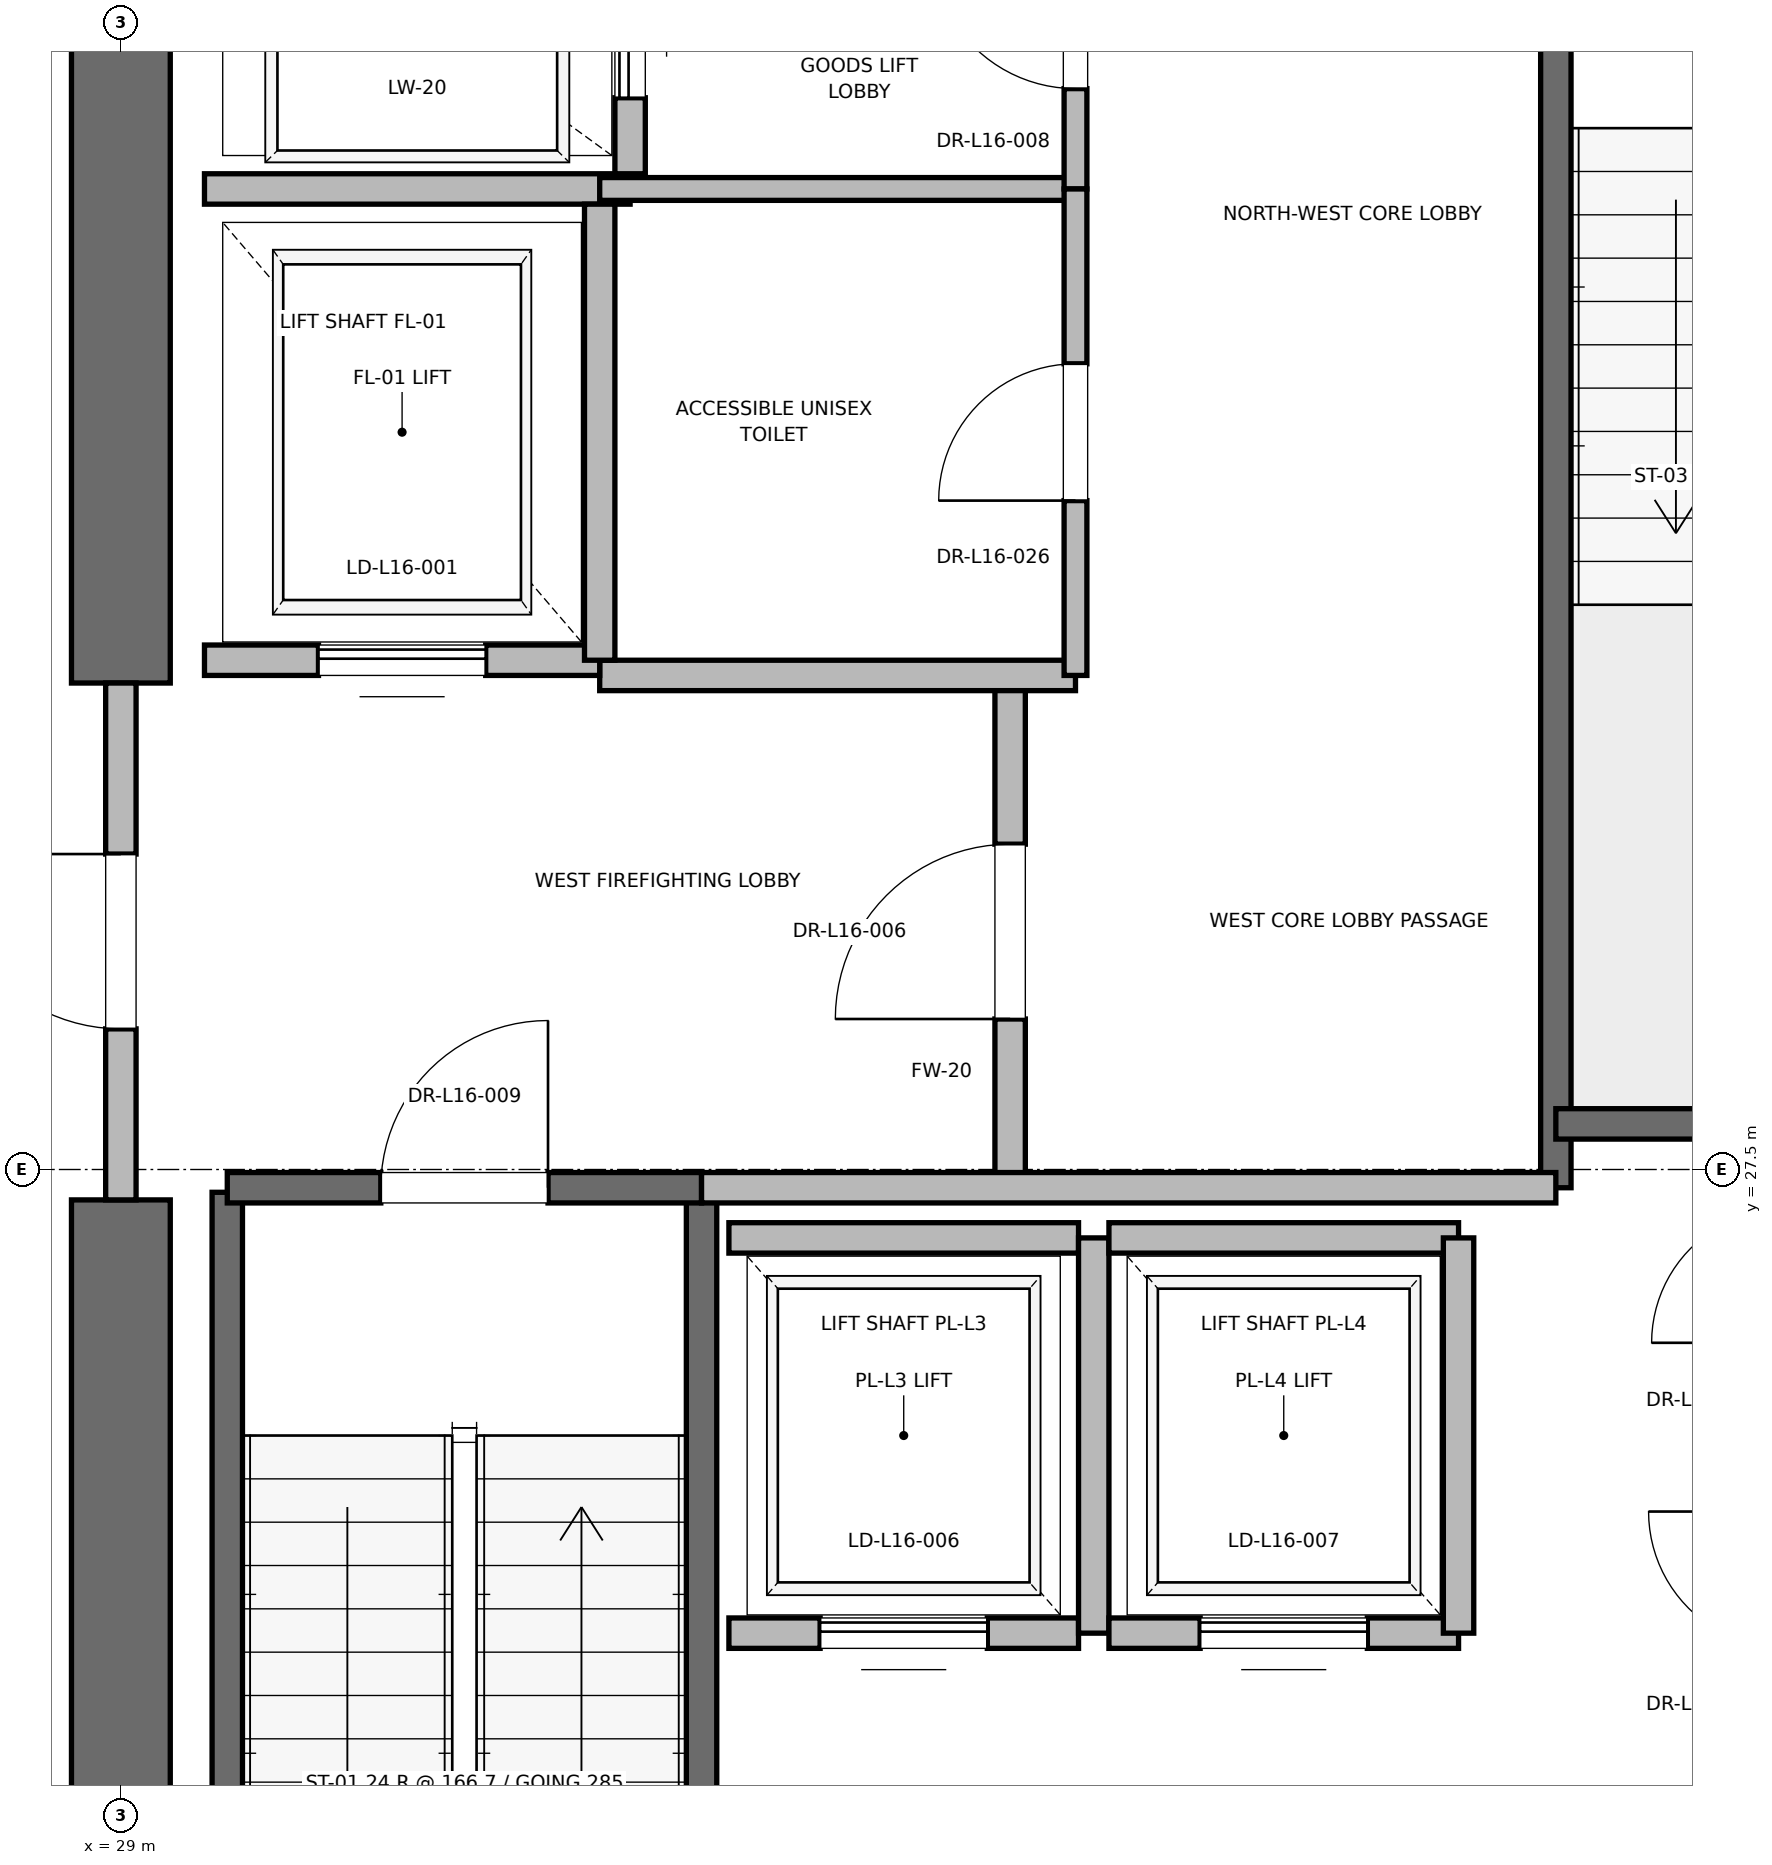
"""IFC4 building model, lengths in metres.
Left out: names, types, materials, properties, quantities, classifications, styles, units other than length and angle.
Written with IfcOpenShell. Run it as: python <this file> out.ifc"""

import sys

from ifc_helpers import new_model, si_unit, direction, frame, frame_2d, origin, place, context, subcontext, project, spatial, rectangle, extrude, element, fill, save


model = new_model("IFC4")
c1 = context("Model", 3, precision=1e-05, world=origin(), true_north=direction((0.0, 1.0)))
c2 = subcontext(c1, "Body", "Model", "MODEL_VIEW")
j1 = project(units=[si_unit("LENGTHUNIT", "METRE"), si_unit("PLANEANGLEUNIT", "RADIAN")], contexts=[c1])
p1 = place(None, origin())
s1 = spatial("IfcSite", under=j1, at=p1, CompositionType="ELEMENT")
p2 = place(p1, origin())
s2 = spatial("IfcBuilding", under=s1, at=p2, CompositionType="ELEMENT")
p3 = place(p2, frame((0.0, 0.0, 71.6)))
s3 = spatial("IfcBuildingStorey", under=s2, at=p3, CompositionType="ELEMENT", Elevation=71.6)
p4 = place(p3, frame((29.0, 18.5, 0.0), z_axis=(0.0, 0.0, 1.0), x_axis=(0.0, 1.0, 0.0)))
e1 = element("IfcWall", 1, at=p4, inside=s3, PredefinedType="SHEAR", context=c2, shape_type="SweptSolid", body=[
    extrude(rectangle(XDim=8.8, YDim=0.65, at=frame_2d((4.4, 0.0))), origin(), (0.0, 0.0, 1.0), 3.76),
])
p5 = place(p3, frame((29.0, 30.7, 0.0), z_axis=(0.0, 0.0, 1.0), x_axis=(0.0, 1.0, 0.0)))
e2 = element("IfcWall", 2, at=p5, inside=s3, PredefinedType="SHEAR", context=c2, shape_type="SweptSolid", body=[
    extrude(rectangle(XDim=5.8, YDim=0.65, at=frame_2d((2.9, 0.0))), origin(), (0.0, 0.0, 1.0), 3.76),
])
p6 = place(p3, frame((29.7, 19.2, 0.0), z_axis=(0.0, 0.0, 1.0), x_axis=(0.0, 1.0, 0.0)))
e3 = element("IfcWall", 3, at=p6, inside=s3, PredefinedType="SOLIDWALL", context=c2, shape_type="SweptSolid", body=[
    extrude(rectangle(XDim=8.15, YDim=0.2, at=frame_2d((4.075, 0.0))), origin(), (0.0, 0.0, 1.0), 3.76),
])
p7 = place(p3, frame((32.82, 18.6, 0.0), z_axis=(0.0, 0.0, 1.0), x_axis=(0.0, 1.0, 0.0)))
e4 = element("IfcWall", 4, at=p7, inside=s3, PredefinedType="SOLIDWALL", context=c2, shape_type="SweptSolid", body=[
    extrude(rectangle(XDim=8.78, YDim=0.2, at=frame_2d((4.39, 0.0))), origin(), (0.0, 0.0, 1.0), 3.76),
])
p8 = place(p3, frame((29.7, 27.38, 0.0), z_axis=(0.0, 0.0, 1.0), x_axis=(1.0, 0.0, 0.0)))
e5 = element("IfcWall", 5, at=p8, inside=s3, PredefinedType="SOLIDWALL", context=c2, shape_type="SweptSolid", body=[
    extrude(rectangle(XDim=3.12, YDim=0.2, at=frame_2d((1.56, 0.0))), origin(), (0.0, 0.0, 1.0), 3.76),
])
p9 = place(p8, frame((1.01, 0.0, 0.0)))
e6 = element("IfcOpeningElement", 6, at=p9, cuts=e5, PredefinedType="OPENING", context=c2, shape_type="SweptSolid", body=[
    extrude(rectangle(XDim=1.1, YDim=2.15, at=frame_2d((0.55, 1.075))), frame((0.0, 0.1, 0.0), z_axis=(0.0, -1.0, 0.0), x_axis=(1.0, 0.0, 0.0)), (0.0, 0.0, 1.0), 0.2),
])
p10 = place(p3, frame((38.44, 27.38, 0.0), z_axis=(0.0, 0.0, 1.0), x_axis=(0.0, 1.0, 0.0)))
e7 = element("IfcWall", 7, at=p10, inside=s3, PredefinedType="SOLIDWALL", context=c2, shape_type="SweptSolid", body=[
    extrude(rectangle(XDim=8.87, YDim=0.2, at=frame_2d((4.435, 0.0))), origin(), (0.0, 0.0, 1.0), 3.76),
])
p11 = place(p3, frame((38.44, 27.8, 0.0), z_axis=(0.0, 0.0, 1.0), x_axis=(1.0, 0.0, 0.0)))
e8 = element("IfcWall", 8, at=p11, inside=s3, PredefinedType="SOLIDWALL", context=c2, shape_type="SweptSolid", body=[
    extrude(rectangle(XDim=3.32, YDim=0.2, at=frame_2d((1.66, 0.0))), origin(), (0.0, 0.0, 1.0), 3.76),
])
p12 = place(p3, frame((34.85, 27.38, 0.0), z_axis=(0.0, 0.0, 1.0), x_axis=(0.0, 1.0, 0.0)))
e9 = element("IfcWall", 9, at=p12, inside=s3, PredefinedType="PARTITIONING", context=c2, shape_type="SweptSolid", body=[
    extrude(rectangle(XDim=3.37, YDim=0.2, at=frame_2d((1.685, 0.0))), origin(), (0.0, 0.0, 1.0), 3.76),
])
p13 = place(p12, frame((1.11, 0.0, 0.0)))
e10 = element("IfcOpeningElement", 10, at=p13, cuts=e9, PredefinedType="OPENING", context=c2, shape_type="SweptSolid", body=[
    extrude(rectangle(XDim=1.15, YDim=2.2, at=frame_2d((0.575, 1.1))), frame((0.0, 0.1, 0.0), z_axis=(0.0, -1.0, 0.0), x_axis=(1.0, 0.0, 0.0)), (0.0, 0.0, 1.0), 0.2),
])
p14 = place(p3, frame((29.0, 27.3, 0.0), z_axis=(0.0, 0.0, 1.0), x_axis=(0.0, 1.0, 0.0)))
e11 = element("IfcWall", 11, at=p14, inside=s3, PredefinedType="PARTITIONING", context=c2, shape_type="SweptSolid", body=[
    extrude(rectangle(XDim=3.4, YDim=0.2, at=frame_2d((1.7, 0.0))), origin(), (0.0, 0.0, 1.0), 2.54),
])
p15 = place(p14, frame((1.125, 0.0, 0.0)))
e12 = element("IfcOpeningElement", 12, at=p15, cuts=e11, PredefinedType="OPENING", context=c2, shape_type="SweptSolid", body=[
    extrude(rectangle(XDim=1.15, YDim=2.2, at=frame_2d((0.575, 1.1))), frame((0.0, 0.1, 0.0), z_axis=(0.0, -1.0, 0.0), x_axis=(1.0, 0.0, 0.0)), (0.0, 0.0, 1.0), 0.2),
])
p16 = place(p3, frame((32.82, 27.38, 0.0), z_axis=(0.0, 0.0, 1.0), x_axis=(1.0, 0.0, 0.0)))
e13 = element("IfcWall", 13, at=p16, inside=s3, PredefinedType="PARTITIONING", context=c2, shape_type="SweptSolid", body=[
    extrude(rectangle(XDim=5.62, YDim=0.2, at=frame_2d((2.81, 0.0))), origin(), (0.0, 0.0, 1.0), 3.76),
])
p17 = place(p3, frame((32.15, 30.75, 0.0), z_axis=(0.0, 0.0, 1.0), x_axis=(1.0, 0.0, 0.0)))
e14 = element("IfcWall", 14, at=p17, inside=s3, PredefinedType="PARTITIONING", context=c2, shape_type="SweptSolid", body=[
    extrude(rectangle(XDim=3.13, YDim=0.2, at=frame_2d((1.565, 0.0))), origin(), (0.0, 0.0, 1.0), 3.76),
])
p18 = place(p3, frame((29.55, 30.85, 0.0), z_axis=(0.0, 0.0, 1.0), x_axis=(1.0, 0.0, 0.0)))
e15 = element("IfcWall", 15, at=p18, inside=s3, PredefinedType="SOLIDWALL", context=c2, shape_type="SweptSolid", body=[
    extrude(rectangle(XDim=2.6, YDim=0.2, at=frame_2d((1.3, 0.0))), origin(), (0.0, 0.0, 1.0), 2.54),
])
p19 = place(p18, frame((0.75, 0.0, 0.0)))
e16 = element("IfcOpeningElement", 16, at=p19, cuts=e15, PredefinedType="OPENING", context=c2, shape_type="SweptSolid", body=[
    extrude(rectangle(XDim=1.1, YDim=2.2, at=frame_2d((0.55, 1.1))), frame((0.0, 0.1, 0.0), z_axis=(0.0, -1.0, 0.0), x_axis=(1.0, 0.0, 0.0)), (0.0, 0.0, 1.0), 0.2),
])
p20 = place(p3, frame((29.55, 33.95, 0.0), z_axis=(0.0, 0.0, 1.0), x_axis=(1.0, 0.0, 0.0)))
e17 = element("IfcWall", 17, at=p20, inside=s3, PredefinedType="SOLIDWALL", context=c2, shape_type="SweptSolid", body=[
    extrude(rectangle(XDim=2.8, YDim=0.2, at=frame_2d((1.4, 0.0))), origin(), (0.0, 0.0, 1.0), 3.76),
])
p21 = place(p3, frame((32.15, 30.85, 0.0), z_axis=(0.0, 0.0, 1.0), x_axis=(0.0, 1.0, 0.0)))
e18 = element("IfcWall", 18, at=p21, inside=s3, PredefinedType="SOLIDWALL", context=c2, shape_type="SweptSolid", body=[
    extrude(rectangle(XDim=3.0, YDim=0.2, at=frame_2d((1.5, 0.0))), origin(), (0.0, 0.0, 1.0), 3.76),
])
p22 = place(p3, frame((32.35, 34.05, 0.0), z_axis=(0.0, 0.0, 1.0), x_axis=(0.0, 1.0, 0.0)))
e19 = element("IfcWall", 19, at=p22, inside=s3, PredefinedType="SOLIDWALL", context=c2, shape_type="SweptSolid", body=[
    extrude(rectangle(XDim=2.1, YDim=0.2, at=frame_2d((1.05, 0.0))), origin(), (0.0, 0.0, 1.0), 3.76),
])
p23 = place(p22, frame((0.5, 0.0, 0.0)))
e20 = element("IfcOpeningElement", 20, at=p23, cuts=e19, PredefinedType="OPENING", context=c2, shape_type="SweptSolid", body=[
    extrude(rectangle(XDim=1.1, YDim=2.2, at=frame_2d((0.55, 1.1))), frame((0.0, 0.1, 0.0), z_axis=(0.0, -1.0, 0.0), x_axis=(1.0, 0.0, 0.0)), (0.0, 0.0, 1.0), 0.2),
])
p24 = place(p3, frame((33.0, 24.45, 0.0), z_axis=(0.0, 0.0, 1.0), x_axis=(1.0, 0.0, 0.0)))
e21 = element("IfcWall", 21, at=p24, inside=s3, PredefinedType="SOLIDWALL", context=c2, shape_type="SweptSolid", body=[
    extrude(rectangle(XDim=2.3, YDim=0.2, at=frame_2d((1.15, 0.0))), origin(), (0.0, 0.0, 1.0), 3.76),
])
p25 = place(p24, frame((0.6, 0.0, 0.0)))
e22 = element("IfcOpeningElement", 22, at=p25, cuts=e21, PredefinedType="OPENING", context=c2, shape_type="SweptSolid", body=[
    extrude(rectangle(XDim=1.1, YDim=2.2, at=frame_2d((0.55, 1.1))), frame((0.0, 0.1, 0.0), z_axis=(0.0, -1.0, 0.0), x_axis=(1.0, 0.0, 0.0)), (0.0, 0.0, 1.0), 0.2),
])
p26 = place(p3, frame((35.3, 27.05, 0.0), z_axis=(0.0, 0.0, 1.0), x_axis=(-1.0, 0.0, 0.0)))
e23 = element("IfcWall", 23, at=p26, inside=s3, PredefinedType="SOLIDWALL", context=c2, shape_type="SweptSolid", body=[
    extrude(rectangle(XDim=2.3, YDim=0.2, at=frame_2d((1.15, 0.0))), origin(), (0.0, 0.0, 1.0), 3.76),
])
p27 = place(p3, frame((35.4, 24.45, 0.0), z_axis=(0.0, 0.0, 1.0), x_axis=(0.0, 1.0, 0.0)))
e24 = element("IfcWall", 24, at=p27, inside=s3, PredefinedType="SOLIDWALL", context=c2, shape_type="SweptSolid", body=[
    extrude(rectangle(XDim=2.6, YDim=0.2, at=frame_2d((1.3, 0.0))), origin(), (0.0, 0.0, 1.0), 3.76),
])
p28 = place(p3, frame((35.5, 24.45, 0.0), z_axis=(0.0, 0.0, 1.0), x_axis=(1.0, 0.0, 0.0)))
e25 = element("IfcWall", 25, at=p28, inside=s3, PredefinedType="SOLIDWALL", context=c2, shape_type="SweptSolid", body=[
    extrude(rectangle(XDim=2.3, YDim=0.2, at=frame_2d((1.15, 0.0))), origin(), (0.0, 0.0, 1.0), 3.76),
])
p29 = place(p28, frame((0.6, 0.0, 0.0)))
e26 = element("IfcOpeningElement", 26, at=p29, cuts=e25, PredefinedType="OPENING", context=c2, shape_type="SweptSolid", body=[
    extrude(rectangle(XDim=1.1, YDim=2.2, at=frame_2d((0.55, 1.1))), frame((0.0, 0.1, 0.0), z_axis=(0.0, -1.0, 0.0), x_axis=(1.0, 0.0, 0.0)), (0.0, 0.0, 1.0), 0.2),
])
p30 = place(p3, frame((37.8, 27.05, 0.0), z_axis=(0.0, 0.0, 1.0), x_axis=(-1.0, 0.0, 0.0)))
e27 = element("IfcWall", 27, at=p30, inside=s3, PredefinedType="SOLIDWALL", context=c2, shape_type="SweptSolid", body=[
    extrude(rectangle(XDim=2.3, YDim=0.2, at=frame_2d((1.15, 0.0))), origin(), (0.0, 0.0, 1.0), 3.76),
])
p31 = place(p3, frame((37.8, 24.45, 0.0), z_axis=(0.0, 0.0, 1.0), x_axis=(0.0, 1.0, 0.0)))
e28 = element("IfcWall", 28, at=p31, inside=s3, PredefinedType="SOLIDWALL", context=c2, shape_type="SweptSolid", body=[
    extrude(rectangle(XDim=2.6, YDim=0.2, at=frame_2d((1.3, 0.0))), origin(), (0.0, 0.0, 1.0), 3.76),
])
p32 = place(p3, frame((32.15, 33.95, 0.0), z_axis=(0.0, 0.0, 1.0), x_axis=(1.0, 0.0, 0.0)))
e29 = element("IfcWall", 29, at=p32, inside=s3, PredefinedType="PARTITIONING", context=c2, shape_type="SweptSolid", body=[
    extrude(rectangle(XDim=3.13, YDim=0.15, at=frame_2d((1.565, 0.0))), origin(), (0.0, 0.0, 1.0), 2.85),
])
p33 = place(p3, frame((35.28, 33.95, 0.0), z_axis=(0.0, 0.0, 1.0), x_axis=(0.0, 1.0, 0.0)))
e30 = element("IfcWall", 30, at=p33, inside=s3, PredefinedType="PARTITIONING", context=c2, shape_type="SweptSolid", body=[
    extrude(rectangle(XDim=2.27, YDim=0.15, at=frame_2d((1.135, 0.0))), origin(), (0.0, 0.0, 1.0), 2.54),
])
p34 = place(p33, frame((0.66, 0.0, 0.0)))
e31 = element("IfcOpeningElement", 31, at=p34, cuts=e30, PredefinedType="OPENING", context=c2, shape_type="SweptSolid", body=[
    extrude(rectangle(XDim=0.95, YDim=2.15, at=frame_2d((0.475, 1.075))), frame((0.0, 0.075, 0.0), z_axis=(0.0, -1.0, 0.0), x_axis=(1.0, 0.0, 0.0)), (0.0, 0.0, 1.0), 0.15),
])
p35 = place(p3, frame((35.28, 30.75, 0.0), z_axis=(0.0, 0.0, 1.0), x_axis=(0.0, 1.0, 0.0)))
e32 = element("IfcWall", 32, at=p35, inside=s3, PredefinedType="PARTITIONING", context=c2, shape_type="SweptSolid", body=[
    extrude(rectangle(XDim=3.2, YDim=0.15, at=frame_2d((1.6, 0.0))), origin(), (0.0, 0.0, 1.0), 2.85),
])
p36 = place(p35, frame((1.15, 0.0, 0.0)))
e33 = element("IfcOpeningElement", 33, at=p36, cuts=e32, PredefinedType="OPENING", context=c2, shape_type="SweptSolid", body=[
    extrude(rectangle(XDim=0.9, YDim=2.1, at=frame_2d((0.45, 1.05))), frame((0.0, 0.075, 0.0), z_axis=(0.0, -1.0, 0.0), x_axis=(1.0, 0.0, 0.0)), (0.0, 0.0, 1.0), 0.15),
])
p37 = place(p9, origin())
e34 = element("IfcDoor", 34, at=p37, inside=s3, OperationType="SINGLE_SWING_RIGHT", PredefinedType="DOOR", context=c2, shape_type="SweptSolid", body=[
    extrude(rectangle(XDim=1.1, YDim=2.15, at=frame_2d((0.55, 1.075))), frame((0.0, 0.025, 0.0), z_axis=(0.0, -1.0, 0.0), x_axis=(1.0, 0.0, 0.0)), (0.0, 0.0, 1.0), 0.05),
])
fill(e6, e34)
p38 = place(p13, origin())
e35 = element("IfcDoor", 35, at=p38, inside=s3, OperationType="SINGLE_SWING_LEFT", PredefinedType="DOOR", context=c2, shape_type="SweptSolid", body=[
    extrude(rectangle(XDim=1.15, YDim=2.2, at=frame_2d((0.575, 1.1))), frame((0.0, 0.025, 0.0), z_axis=(0.0, -1.0, 0.0), x_axis=(1.0, 0.0, 0.0)), (0.0, 0.0, 1.0), 0.05),
])
fill(e10, e35)
p39 = place(p15, origin())
e36 = element("IfcDoor", 36, at=p39, inside=s3, OperationType="SINGLE_SWING_RIGHT", PredefinedType="DOOR", context=c2, shape_type="SweptSolid", body=[
    extrude(rectangle(XDim=1.15, YDim=2.2, at=frame_2d((0.575, 1.1))), frame((0.0, 0.025, 0.0), z_axis=(0.0, -1.0, 0.0), x_axis=(1.0, 0.0, 0.0)), (0.0, 0.0, 1.0), 0.05),
])
fill(e12, e36)
p40 = place(p19, origin())
e37 = element("IfcDoor", 37, at=p40, inside=s3, OperationType="SLIDING_TO_RIGHT", PredefinedType="DOOR", context=c2, shape_type="SweptSolid", body=[
    extrude(rectangle(XDim=1.1, YDim=2.2, at=frame_2d((0.55, 1.1))), frame((0.0, 0.025, 0.0), z_axis=(0.0, -1.0, 0.0), x_axis=(1.0, 0.0, 0.0)), (0.0, 0.0, 1.0), 0.05),
])
fill(e16, e37)
p41 = place(p23, origin())
e38 = element("IfcDoor", 38, at=p41, inside=s3, OperationType="SLIDING_TO_RIGHT", PredefinedType="DOOR", context=c2, shape_type="SweptSolid", body=[
    extrude(rectangle(XDim=1.1, YDim=2.2, at=frame_2d((0.55, 1.1))), frame((0.0, 0.025, 0.0), z_axis=(0.0, -1.0, 0.0), x_axis=(1.0, 0.0, 0.0)), (0.0, 0.0, 1.0), 0.05),
])
fill(e20, e38)
p42 = place(p25, origin())
e39 = element("IfcDoor", 39, at=p42, inside=s3, OperationType="SLIDING_TO_RIGHT", PredefinedType="DOOR", context=c2, shape_type="SweptSolid", body=[
    extrude(rectangle(XDim=1.1, YDim=2.2, at=frame_2d((0.55, 1.1))), frame((0.0, 0.025, 0.0), z_axis=(0.0, -1.0, 0.0), x_axis=(1.0, 0.0, 0.0)), (0.0, 0.0, 1.0), 0.05),
])
fill(e22, e39)
p43 = place(p29, origin())
e40 = element("IfcDoor", 40, at=p43, inside=s3, OperationType="SLIDING_TO_RIGHT", PredefinedType="DOOR", context=c2, shape_type="SweptSolid", body=[
    extrude(rectangle(XDim=1.1, YDim=2.2, at=frame_2d((0.55, 1.1))), frame((0.0, 0.025, 0.0), z_axis=(0.0, -1.0, 0.0), x_axis=(1.0, 0.0, 0.0)), (0.0, 0.0, 1.0), 0.05),
])
fill(e26, e40)
p44 = place(p34, origin())
e41 = element("IfcDoor", 41, at=p44, inside=s3, OperationType="SINGLE_SWING_RIGHT", PredefinedType="DOOR", context=c2, shape_type="SweptSolid", body=[
    extrude(rectangle(XDim=0.95, YDim=2.15, at=frame_2d((0.475, 1.075))), frame((0.0, 0.025, 0.0), z_axis=(0.0, -1.0, 0.0), x_axis=(1.0, 0.0, 0.0)), (0.0, 0.0, 1.0), 0.05),
])
fill(e31, e41)
p45 = place(p36, origin())
e42 = element("IfcDoor", 42, at=p45, inside=s3, OperationType="SINGLE_SWING_LEFT", PredefinedType="DOOR", context=c2, shape_type="SweptSolid", body=[
    extrude(rectangle(XDim=0.9, YDim=2.1, at=frame_2d((0.45, 1.05))), frame((0.0, 0.025, 0.0), z_axis=(0.0, -1.0, 0.0), x_axis=(1.0, 0.0, 0.0)), (0.0, 0.0, 1.0), 0.05),
])
fill(e33, e42)
save(model, sys.argv[1])
